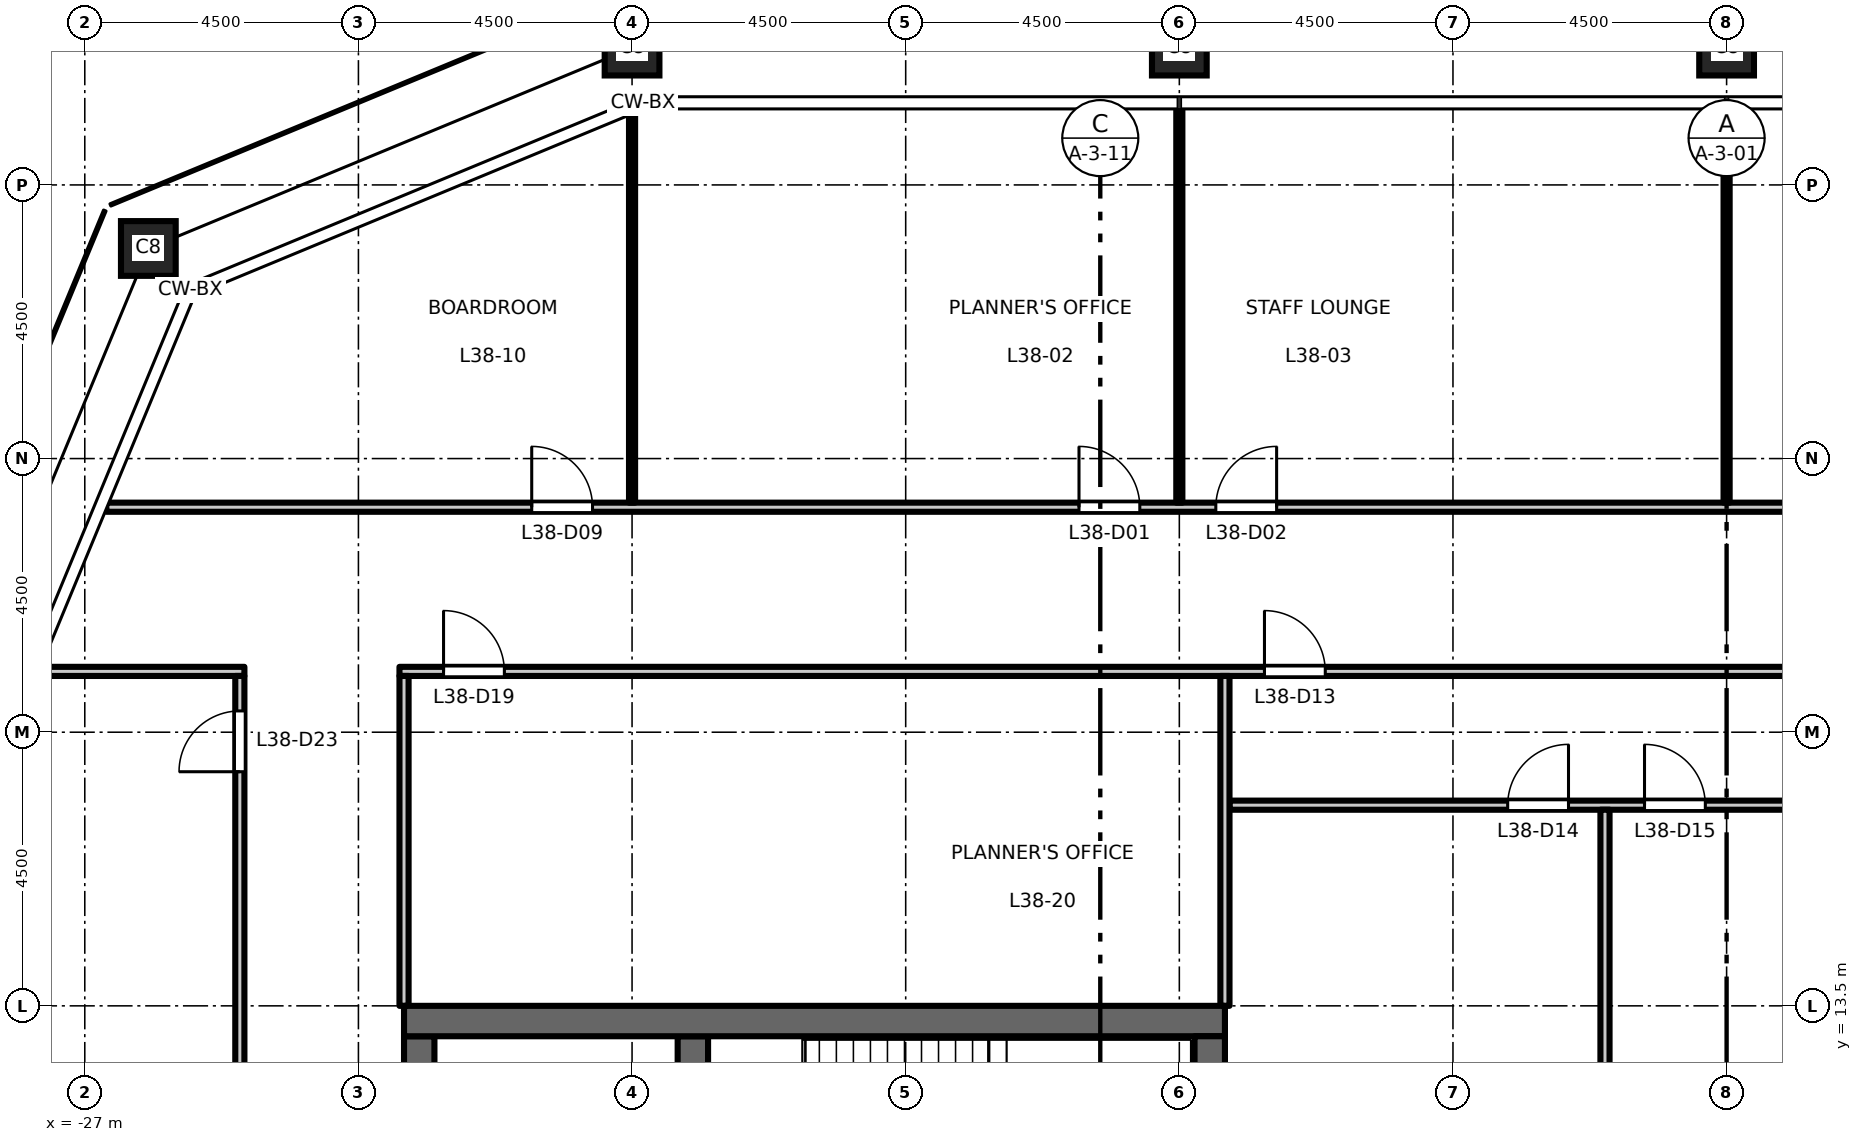
"""IFC4 building model, lengths in metres.
Left out: names, types, materials, properties, quantities, classifications, styles, units other than length and angle.
Written with IfcOpenShell. Run it as: python <this file> out.ifc"""

import sys

from ifc_helpers import new_model, si_unit, direction, frame, frame_2d, origin, origin_2d, place, context, subcontext, project, spatial, rectangle, hollow_rectangle, extrude, element, fill, save


model = new_model("IFC4")
c1 = context("Model", 3, precision=1e-05, world=origin(), true_north=direction((0.0, 1.0)))
c2 = subcontext(c1, "Body", "Model", "MODEL_VIEW")
j1 = project(units=[si_unit("LENGTHUNIT", "METRE"), si_unit("PLANEANGLEUNIT", "RADIAN")], contexts=[c1])
p1 = place(None, origin())
s1 = spatial("IfcSite", under=j1, at=p1, CompositionType="ELEMENT")
p2 = place(p1, origin())
s2 = spatial("IfcBuilding", under=s1, at=p2, CompositionType="ELEMENT")
p3 = place(p2, frame((0.0, 0.0, 176.7)))
s3 = spatial("IfcBuildingStorey", under=s2, at=p3, CompositionType="ELEMENT", Elevation=176.7)
for number, where, z_axis, x_axis in (
    (1, (0.0, 29.25, 0.0), (0.0, 0.0, 1.0), (1.0, 0.0, 0.0)),
    (2, (-9.0, 29.25, 0.0), (0.0, 0.0, 1.0), (1.0, 0.0, 0.0)),
    (3, (-18.0, 29.25, 0.0), (0.0, 0.0, 1.0), (1.0, 0.0, 0.0)),
    (4, (-25.955, 25.955, 0.0), (0.0, 0.0, 1.0), (1.0, 0.0, 0.0)),
):
    element("IfcColumn", number, at=place(p3, frame(where, z_axis=z_axis, x_axis=x_axis)), inside=s3, PredefinedType="COLUMN", context=c2, shape_type="SweptSolid", body=[
        extrude(hollow_rectangle(XDim=0.9, YDim=0.9, WallThickness=0.05, at=origin_2d()), origin(), (0.0, 0.0, 1.0), 4.5),
    ])
p4 = place(p3, frame((-21.5, -13.0, 0.0), z_axis=(0.0, 0.0, 1.0), x_axis=(0.0, 1.0, 0.0)))
e5 = element("IfcWall", 5, at=p4, inside=s3, PredefinedType="SHEAR", context=c2, shape_type="SweptSolid", body=[
    extrude(rectangle(XDim=26.0, YDim=0.5, at=frame_2d((13.0, 0.0))), origin(), (0.0, 0.0, 1.0), 4.3),
])
p5 = place(p4, frame((16.825, 0.0, 0.0)))
e6 = element("IfcOpeningElement", 6, at=p5, cuts=e5, PredefinedType="OPENING", context=c2, shape_type="SweptSolid", body=[
    extrude(rectangle(XDim=1.8, YDim=2.1, at=frame_2d((0.9, 1.05))), frame((0.0, 0.26, 0.0), z_axis=(0.0, -1.0, 0.0), x_axis=(1.0, 0.0, 0.0)), (0.0, 0.0, 1.0), 0.52),
])
p6 = place(p4, frame((7.375, 0.0, 0.0)))
e7 = element("IfcOpeningElement", 7, at=p6, cuts=e5, PredefinedType="OPENING", context=c2, shape_type="SweptSolid", body=[
    extrude(rectangle(XDim=1.8, YDim=2.1, at=frame_2d((0.9, 1.05))), frame((0.0, 0.26, 0.0), z_axis=(0.0, -1.0, 0.0), x_axis=(1.0, 0.0, 0.0)), (0.0, 0.0, 1.0), 0.52),
])
p7 = place(p4, frame((23.8, 0.0, 0.0)))
e8 = element("IfcOpeningElement", 8, at=p7, cuts=e5, PredefinedType="OPENING", context=c2, shape_type="SweptSolid", body=[
    extrude(rectangle(XDim=0.9, YDim=2.1, at=frame_2d((0.45, 1.05))), frame((0.0, 0.26, 0.0), z_axis=(0.0, -1.0, 0.0), x_axis=(1.0, 0.0, 0.0)), (0.0, 0.0, 1.0), 0.52),
])
p8 = place(p3, frame((-17.0, 6.425, 0.0), z_axis=(0.0, 0.0, 1.0), x_axis=(0.0, 1.0, 0.0)))
e9 = element("IfcWall", 9, at=p8, inside=s3, PredefinedType="SHEAR", context=c2, shape_type="SweptSolid", body=[
    extrude(rectangle(XDim=6.575, YDim=0.5, at=frame_2d((3.288, 0.0))), origin(), (0.0, 0.0, 1.0), 4.3),
])
p9 = place(p3, frame((-8.25, 13.25, 0.0), z_axis=(0.0, 0.0, 1.0), x_axis=(-1.0, 0.0, 0.0)))
e10 = element("IfcWall", 10, at=p9, inside=s3, PredefinedType="SHEAR", context=c2, shape_type="SweptSolid", body=[
    extrude(rectangle(XDim=13.5, YDim=0.5, at=frame_2d((6.75, 0.0))), origin(), (0.0, 0.0, 1.0), 4.3),
])
p10 = place(p3, frame((-8.5, -13.0, 0.0), z_axis=(0.0, 0.0, 1.0), x_axis=(0.0, 1.0, 0.0)))
e11 = element("IfcWall", 11, at=p10, inside=s3, PredefinedType="SHEAR", context=c2, shape_type="SweptSolid", body=[
    extrude(rectangle(XDim=26.0, YDim=0.5, at=frame_2d((13.0, 0.0))), origin(), (0.0, 0.0, 1.0), 4.3),
])
p11 = place(p3, frame((-8.175, 16.8, 0.0), z_axis=(0.0, 0.0, 1.0), x_axis=(1.0, 0.0, 0.0)))
e12 = element("IfcWall", 12, at=p11, inside=s3, PredefinedType="PARTITIONING", context=c2, shape_type="SweptSolid", body=[
    extrude(rectangle(XDim=15.095, YDim=0.15, at=frame_2d((7.547, 0.0))), origin(), (0.0, 0.0, 1.0), 4.3),
])
p12 = place(p11, frame((4.575, 0.0, 0.0)))
e13 = element("IfcOpeningElement", 13, at=p12, cuts=e12, PredefinedType="OPENING", context=c2, shape_type="SweptSolid", body=[
    extrude(rectangle(XDim=1.0, YDim=2.1, at=frame_2d((0.5, 1.05))), frame((0.0, 0.085, 0.0), z_axis=(0.0, -1.0, 0.0), x_axis=(1.0, 0.0, 0.0)), (0.0, 0.0, 1.0), 0.17),
])
p13 = place(p11, frame((6.825, 0.0, 0.0)))
e14 = element("IfcOpeningElement", 14, at=p13, cuts=e12, PredefinedType="OPENING", context=c2, shape_type="SweptSolid", body=[
    extrude(rectangle(XDim=1.0, YDim=2.1, at=frame_2d((0.5, 1.05))), frame((0.0, 0.085, 0.0), z_axis=(0.0, -1.0, 0.0), x_axis=(1.0, 0.0, 0.0)), (0.0, 0.0, 1.0), 0.17),
])
p14 = place(p11, frame((13.575, 0.0, 0.0)))
e15 = element("IfcOpeningElement", 15, at=p14, cuts=e12, PredefinedType="OPENING", context=c2, shape_type="SweptSolid", body=[
    extrude(rectangle(XDim=1.0, YDim=2.1, at=frame_2d((0.5, 1.05))), frame((0.0, 0.085, 0.0), z_axis=(0.0, -1.0, 0.0), x_axis=(1.0, 0.0, 0.0)), (0.0, 0.0, 1.0), 0.17),
])
p15 = place(p3, frame((-27.764, 19.0, 0.0), z_axis=(0.0, 0.0, 1.0), x_axis=(1.0, 0.0, 0.0)))
e16 = element("IfcWall", 16, at=p15, inside=s3, PredefinedType="PARTITIONING", context=c2, shape_type="SweptSolid", body=[
    extrude(rectangle(XDim=3.389, YDim=0.15, at=frame_2d((1.694, 0.0))), origin(), (0.0, 0.0, 1.0), 4.3),
])
p16 = place(p3, frame((-21.825, 19.0, 0.0), z_axis=(0.0, 0.0, 1.0), x_axis=(1.0, 0.0, 0.0)))
e17 = element("IfcWall", 17, at=p16, inside=s3, PredefinedType="PARTITIONING", context=c2, shape_type="SweptSolid", body=[
    extrude(rectangle(XDim=43.65, YDim=0.15, at=frame_2d((21.825, 0.0))), origin(), (0.0, 0.0, 1.0), 4.3),
])
p17 = place(p16, frame((14.225, 0.0, 0.0)))
e18 = element("IfcOpeningElement", 18, at=p17, cuts=e17, PredefinedType="OPENING", context=c2, shape_type="SweptSolid", body=[
    extrude(rectangle(XDim=1.0, YDim=2.1, at=frame_2d((0.5, 1.05))), frame((0.0, 0.085, 0.0), z_axis=(0.0, -1.0, 0.0), x_axis=(1.0, 0.0, 0.0)), (0.0, 0.0, 1.0), 0.17),
])
p18 = place(p16, frame((0.725, 0.0, 0.0)))
e19 = element("IfcOpeningElement", 19, at=p18, cuts=e17, PredefinedType="OPENING", context=c2, shape_type="SweptSolid", body=[
    extrude(rectangle(XDim=1.0, YDim=2.1, at=frame_2d((0.5, 1.05))), frame((0.0, 0.085, 0.0), z_axis=(0.0, -1.0, 0.0), x_axis=(1.0, 0.0, 0.0)), (0.0, 0.0, 1.0), 0.17),
])
p19 = place(p16, frame((41.975, 0.0, 0.0)))
e20 = element("IfcOpeningElement", 20, at=p19, cuts=e17, PredefinedType="OPENING", context=c2, shape_type="SweptSolid", body=[
    extrude(rectangle(XDim=1.0, YDim=2.1, at=frame_2d((0.5, 1.05))), frame((0.0, 0.085, 0.0), z_axis=(0.0, -1.0, 0.0), x_axis=(1.0, 0.0, 0.0)), (0.0, 0.0, 1.0), 0.17),
])
p20 = place(p3, frame((-26.646, 21.7, 0.0), z_axis=(0.0, 0.0, 1.0), x_axis=(1.0, 0.0, 0.0)))
e21 = element("IfcWall", 21, at=p20, inside=s3, PredefinedType="PARTITIONING", context=c2, shape_type="SweptSolid", body=[
    extrude(rectangle(XDim=53.292, YDim=0.15, at=frame_2d((26.646, 0.0))), origin(), (0.0, 0.0, 1.0), 4.3),
])
p21 = place(p20, frame((15.996, 0.0, 0.0)))
e22 = element("IfcOpeningElement", 22, at=p21, cuts=e21, PredefinedType="OPENING", context=c2, shape_type="SweptSolid", body=[
    extrude(rectangle(XDim=1.0, YDim=2.1, at=frame_2d((0.5, 1.05))), frame((0.0, 0.085, 0.0), z_axis=(0.0, -1.0, 0.0), x_axis=(1.0, 0.0, 0.0)), (0.0, 0.0, 1.0), 0.17),
])
p22 = place(p20, frame((18.246, 0.0, 0.0)))
e23 = element("IfcOpeningElement", 23, at=p22, cuts=e21, PredefinedType="OPENING", context=c2, shape_type="SweptSolid", body=[
    extrude(rectangle(XDim=1.0, YDim=2.1, at=frame_2d((0.5, 1.05))), frame((0.0, 0.085, 0.0), z_axis=(0.0, -1.0, 0.0), x_axis=(1.0, 0.0, 0.0)), (0.0, 0.0, 1.0), 0.17),
])
p23 = place(p20, frame((33.996, 0.0, 0.0)))
e24 = element("IfcOpeningElement", 24, at=p23, cuts=e21, PredefinedType="OPENING", context=c2, shape_type="SweptSolid", body=[
    extrude(rectangle(XDim=1.0, YDim=2.1, at=frame_2d((0.5, 1.05))), frame((0.0, 0.085, 0.0), z_axis=(0.0, -1.0, 0.0), x_axis=(1.0, 0.0, 0.0)), (0.0, 0.0, 1.0), 0.17),
])
p24 = place(p20, frame((36.246, 0.0, 0.0)))
e25 = element("IfcOpeningElement", 25, at=p24, cuts=e21, PredefinedType="OPENING", context=c2, shape_type="SweptSolid", body=[
    extrude(rectangle(XDim=1.0, YDim=2.1, at=frame_2d((0.5, 1.05))), frame((0.0, 0.085, 0.0), z_axis=(0.0, -1.0, 0.0), x_axis=(1.0, 0.0, 0.0)), (0.0, 0.0, 1.0), 0.17),
])
p25 = place(p20, frame((6.996, 0.0, 0.0)))
e26 = element("IfcOpeningElement", 26, at=p25, cuts=e21, PredefinedType="OPENING", context=c2, shape_type="SweptSolid", body=[
    extrude(rectangle(XDim=1.0, YDim=2.1, at=frame_2d((0.5, 1.05))), frame((0.0, 0.085, 0.0), z_axis=(0.0, -1.0, 0.0), x_axis=(1.0, 0.0, 0.0)), (0.0, 0.0, 1.0), 0.17),
])
p26 = place(p20, frame((45.142, 0.0, 0.0)))
e27 = element("IfcOpeningElement", 27, at=p26, cuts=e21, PredefinedType="OPENING", context=c2, shape_type="SweptSolid", body=[
    extrude(rectangle(XDim=1.0, YDim=2.1, at=frame_2d((0.5, 1.05))), frame((0.0, 0.085, 0.0), z_axis=(0.0, -1.0, 0.0), x_axis=(1.0, 0.0, 0.0)), (0.0, 0.0, 1.0), 0.17),
])
p27 = place(p3, frame((-24.45, -18.925, 0.0), z_axis=(0.0, 0.0, 1.0), x_axis=(0.0, 1.0, 0.0)))
e28 = element("IfcWall", 28, at=p27, inside=s3, PredefinedType="PARTITIONING", context=c2, shape_type="SweptSolid", body=[
    extrude(rectangle(XDim=37.85, YDim=0.15, at=frame_2d((18.925, 0.0))), origin(), (0.0, 0.0, 1.0), 4.3),
])
p28 = place(p27, frame((36.275, 0.0, 0.0)))
e29 = element("IfcOpeningElement", 29, at=p28, cuts=e28, PredefinedType="OPENING", context=c2, shape_type="SweptSolid", body=[
    extrude(rectangle(XDim=1.0, YDim=2.1, at=frame_2d((0.5, 1.05))), frame((0.0, 0.085, 0.0), z_axis=(0.0, -1.0, 0.0), x_axis=(1.0, 0.0, 0.0)), (0.0, 0.0, 1.0), 0.17),
])
p29 = place(p3, frame((-21.75, 13.5, 0.0), z_axis=(0.0, 0.0, 1.0), x_axis=(0.0, 1.0, 0.0)))
e30 = element("IfcWall", 30, at=p29, inside=s3, PredefinedType="PARTITIONING", context=c2, shape_type="SweptSolid", body=[
    extrude(rectangle(XDim=5.425, YDim=0.15, at=frame_2d((2.712, 0.0))), origin(), (0.0, 0.0, 1.0), 4.3),
])
p30 = place(p3, frame((-18.0, 21.775, 0.0), z_axis=(0.0, 0.0, 1.0), x_axis=(0.0, 1.0, 0.0)))
e31 = element("IfcWall", 31, at=p30, inside=s3, PredefinedType="PARTITIONING", context=c2, shape_type="SweptSolid", body=[
    extrude(rectangle(XDim=6.403, YDim=0.1, at=frame_2d((3.202, 0.0))), origin(), (0.0, 0.0, 1.0), 3.4),
])
p31 = place(p3, frame((-9.0, 21.775, 0.0), z_axis=(0.0, 0.0, 1.0), x_axis=(0.0, 1.0, 0.0)))
e32 = element("IfcWall", 32, at=p31, inside=s3, PredefinedType="PARTITIONING", context=c2, shape_type="SweptSolid", body=[
    extrude(rectangle(XDim=6.485, YDim=0.1, at=frame_2d((3.243, 0.0))), origin(), (0.0, 0.0, 1.0), 3.4),
])
p32 = place(p3, frame((-8.25, 13.5, 0.0), z_axis=(0.0, 0.0, 1.0), x_axis=(0.0, 1.0, 0.0)))
e33 = element("IfcWall", 33, at=p32, inside=s3, PredefinedType="PARTITIONING", context=c2, shape_type="SweptSolid", body=[
    extrude(rectangle(XDim=5.425, YDim=0.15, at=frame_2d((2.712, 0.0))), origin(), (0.0, 0.0, 1.0), 4.3),
])
p33 = place(p3, frame((-2.0, 8.37, 0.0), z_axis=(0.0, 0.0, 1.0), x_axis=(0.0, 1.0, 0.0)))
e34 = element("IfcWall", 34, at=p33, inside=s3, PredefinedType="PARTITIONING", context=c2, shape_type="SweptSolid", body=[
    extrude(rectangle(XDim=8.355, YDim=0.15, at=frame_2d((4.177, 0.0))), origin(), (0.0, 0.0, 1.0), 4.3),
])
p34 = place(p3, frame((0.0, 21.775, 0.0), z_axis=(0.0, 0.0, 1.0), x_axis=(0.0, 1.0, 0.0)))
e35 = element("IfcWall", 35, at=p34, inside=s3, PredefinedType="PARTITIONING", context=c2, shape_type="SweptSolid", body=[
    extrude(rectangle(XDim=6.485, YDim=0.1, at=frame_2d((3.243, 0.0))), origin(), (0.0, 0.0, 1.0), 3.4),
])
p35 = place(p21, origin())
e36 = element("IfcDoor", 36, at=p35, inside=s3, OperationType="SINGLE_SWING_LEFT", PredefinedType="DOOR", context=c2, shape_type="SweptSolid", body=[
    extrude(rectangle(XDim=1.0, YDim=2.1, at=frame_2d((0.5, 1.05))), frame((0.0, 0.025, 0.0), z_axis=(0.0, -1.0, 0.0), x_axis=(1.0, 0.0, 0.0)), (0.0, 0.0, 1.0), 0.05),
])
fill(e22, e36)
p36 = place(p22, origin())
e37 = element("IfcDoor", 37, at=p36, inside=s3, OperationType="SINGLE_SWING_RIGHT", PredefinedType="DOOR", context=c2, shape_type="SweptSolid", body=[
    extrude(rectangle(XDim=1.0, YDim=2.1, at=frame_2d((0.5, 1.05))), frame((0.0, 0.025, 0.0), z_axis=(0.0, -1.0, 0.0), x_axis=(1.0, 0.0, 0.0)), (0.0, 0.0, 1.0), 0.05),
])
fill(e23, e37)
p37 = place(p25, origin())
e38 = element("IfcDoor", 38, at=p37, inside=s3, OperationType="SINGLE_SWING_LEFT", PredefinedType="DOOR", context=c2, shape_type="SweptSolid", body=[
    extrude(rectangle(XDim=1.0, YDim=2.1, at=frame_2d((0.5, 1.05))), frame((0.0, 0.025, 0.0), z_axis=(0.0, -1.0, 0.0), x_axis=(1.0, 0.0, 0.0)), (0.0, 0.0, 1.0), 0.05),
])
fill(e26, e38)
p38 = place(p17, origin())
e39 = element("IfcDoor", 39, at=p38, inside=s3, OperationType="SINGLE_SWING_LEFT", PredefinedType="DOOR", context=c2, shape_type="SweptSolid", body=[
    extrude(rectangle(XDim=1.0, YDim=2.1, at=frame_2d((0.5, 1.05))), frame((0.0, 0.025, 0.0), z_axis=(0.0, -1.0, 0.0), x_axis=(1.0, 0.0, 0.0)), (0.0, 0.0, 1.0), 0.05),
])
fill(e18, e39)
p39 = place(p12, origin())
e40 = element("IfcDoor", 40, at=p39, inside=s3, OperationType="SINGLE_SWING_RIGHT", PredefinedType="DOOR", context=c2, shape_type="SweptSolid", body=[
    extrude(rectangle(XDim=1.0, YDim=2.1, at=frame_2d((0.5, 1.05))), frame((0.0, 0.025, 0.0), z_axis=(0.0, -1.0, 0.0), x_axis=(1.0, 0.0, 0.0)), (0.0, 0.0, 1.0), 0.05),
])
fill(e13, e40)
p40 = place(p13, origin())
e41 = element("IfcDoor", 41, at=p40, inside=s3, OperationType="SINGLE_SWING_LEFT", PredefinedType="DOOR", context=c2, shape_type="SweptSolid", body=[
    extrude(rectangle(XDim=1.0, YDim=2.1, at=frame_2d((0.5, 1.05))), frame((0.0, 0.025, 0.0), z_axis=(0.0, -1.0, 0.0), x_axis=(1.0, 0.0, 0.0)), (0.0, 0.0, 1.0), 0.05),
])
fill(e14, e41)
p41 = place(p18, origin())
e42 = element("IfcDoor", 42, at=p41, inside=s3, OperationType="SINGLE_SWING_LEFT", PredefinedType="DOOR", context=c2, shape_type="SweptSolid", body=[
    extrude(rectangle(XDim=1.0, YDim=2.1, at=frame_2d((0.5, 1.05))), frame((0.0, 0.025, 0.0), z_axis=(0.0, -1.0, 0.0), x_axis=(1.0, 0.0, 0.0)), (0.0, 0.0, 1.0), 0.05),
])
fill(e19, e42)
p42 = place(p28, origin())
e43 = element("IfcDoor", 43, at=p42, inside=s3, OperationType="SINGLE_SWING_LEFT", PredefinedType="DOOR", context=c2, shape_type="SweptSolid", body=[
    extrude(rectangle(XDim=1.0, YDim=2.1, at=frame_2d((0.5, 1.05))), frame((0.0, 0.025, 0.0), z_axis=(0.0, -1.0, 0.0), x_axis=(1.0, 0.0, 0.0)), (0.0, 0.0, 1.0), 0.05),
])
fill(e29, e43)
save(model, sys.argv[1])
